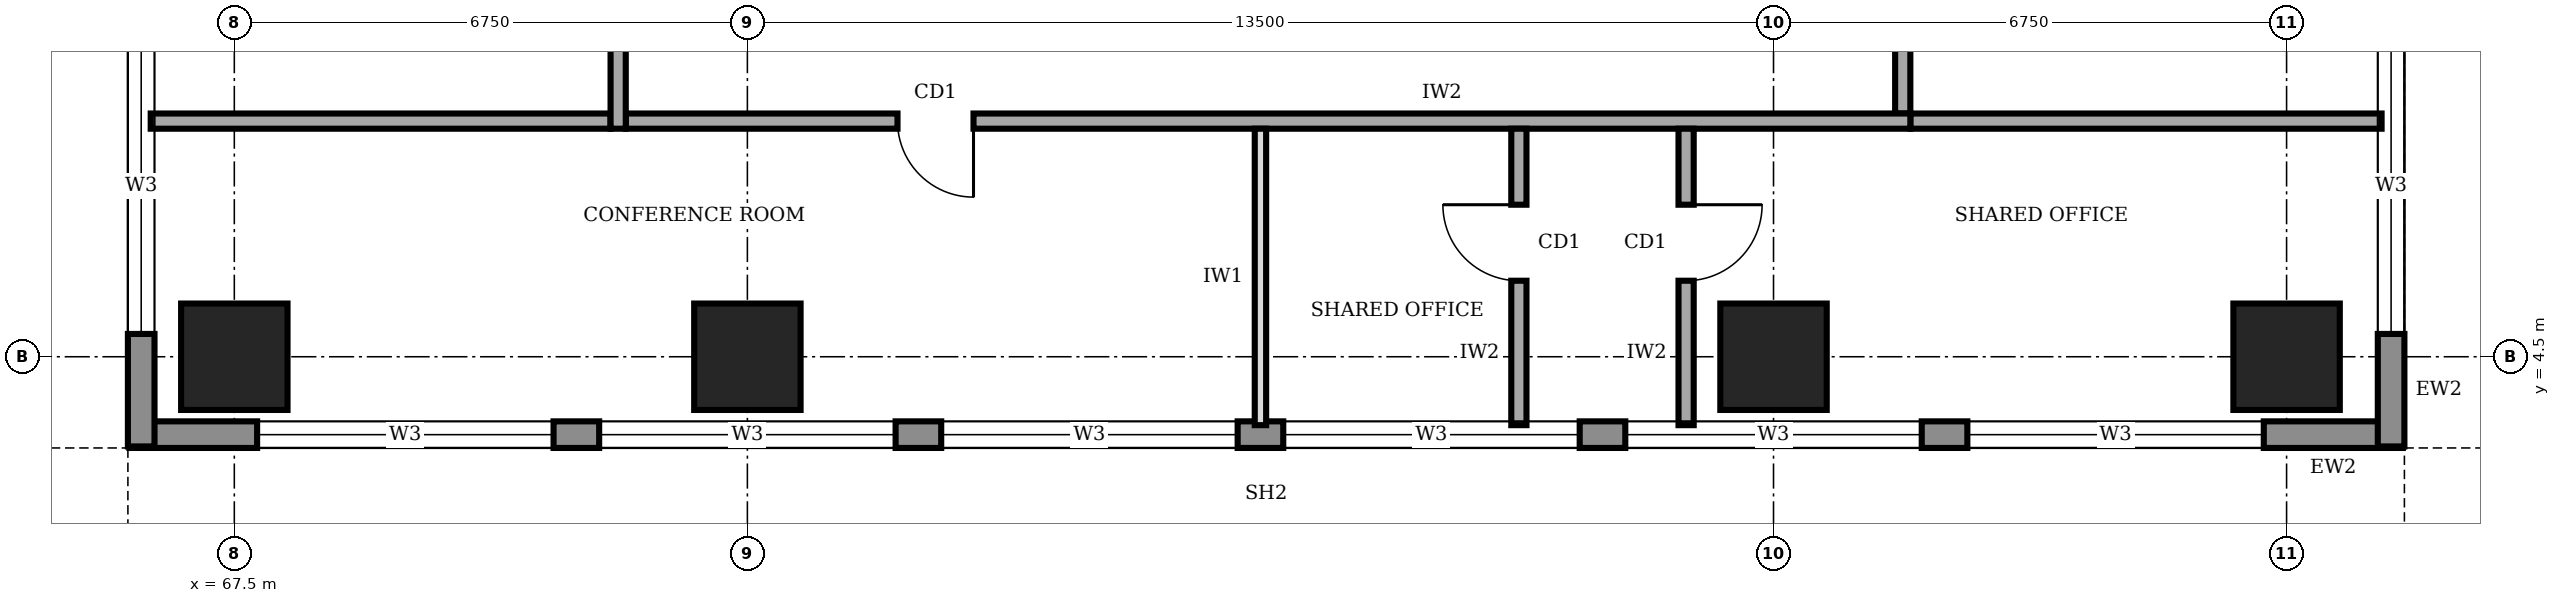
"""IFC4 building model, lengths in metres.
Left out: names, types, materials, properties, quantities, classifications, styles, units other than length and angle.
Written with IfcOpenShell. Run it as: python <this file> out.ifc"""

import sys

from ifc_helpers import new_model, si_unit, direction, frame, frame_2d, origin, origin_2d, place, context, subcontext, project, spatial, rectangle, extrude, element, fill, save


model = new_model("IFC4")
c1 = context("Model", 3, precision=1e-05, world=origin(), true_north=direction((0.0, 1.0)))
c2 = subcontext(c1, "Body", "Model", "MODEL_VIEW")
j1 = project(units=[si_unit("LENGTHUNIT", "METRE"), si_unit("PLANEANGLEUNIT", "RADIAN")], contexts=[c1])
p1 = place(None, origin())
s1 = spatial("IfcSite", under=j1, at=p1, CompositionType="ELEMENT")
p2 = place(p1, origin())
s2 = spatial("IfcBuilding", under=s1, at=p2, CompositionType="ELEMENT")
p3 = place(p2, frame((0.0, 0.0, 189.0)))
s3 = spatial("IfcBuildingStorey", under=s2, at=p3, CompositionType="ELEMENT", Elevation=189.0)
for number, where, z_axis, x_axis in (
    (1, (67.5, 4.5, 0.0), (0.0, 0.0, 1.0), (1.0, 0.0, 0.0)),
    (2, (74.25, 4.5, 0.0), (0.0, 0.0, 1.0), (1.0, 0.0, 0.0)),
    (3, (87.75, 4.5, 0.0), (0.0, 0.0, 1.0), (1.0, 0.0, 0.0)),
    (4, (94.5, 4.5, 0.0), (0.0, 0.0, 1.0), (1.0, 0.0, 0.0)),
):
    element("IfcColumn", number, at=place(p3, frame(where, z_axis=z_axis, x_axis=x_axis)), inside=s3, PredefinedType="COLUMN", context=c2, shape_type="SweptSolid", body=[
        extrude(rectangle(XDim=1.4, YDim=1.4, at=origin_2d()), origin(), (0.0, 0.0, 1.0), 4.0),
    ])
p4 = place(p3, frame((66.12, 3.475, 0.0), z_axis=(0.0, 0.0, 1.0), x_axis=(1.0, 0.0, 0.0)))
e5 = element("IfcWall", 5, at=p4, inside=s3, PredefinedType="STANDARD", context=c2, shape_type="SweptSolid", body=[
    extrude(rectangle(XDim=29.91, YDim=0.35, at=frame_2d((14.955, 0.0))), origin(), (0.0, 0.0, 1.0), 3.75),
])
p5 = place(p4, frame((1.68, 0.0, 0.95)))
e6 = element("IfcOpeningElement", 6, at=p5, cuts=e5, PredefinedType="OPENING", context=c2, shape_type="SweptSolid", body=[
    extrude(rectangle(XDim=3.9, YDim=1.8, at=frame_2d((1.95, 0.9))), frame((0.0, 0.185, 0.0), z_axis=(0.0, -1.0, 0.0), x_axis=(1.0, 0.0, 0.0)), (0.0, 0.0, 1.0), 0.37),
])
p6 = place(p4, frame((6.18, 0.0, 0.95)))
e7 = element("IfcOpeningElement", 7, at=p6, cuts=e5, PredefinedType="OPENING", context=c2, shape_type="SweptSolid", body=[
    extrude(rectangle(XDim=3.9, YDim=1.8, at=frame_2d((1.95, 0.9))), frame((0.0, 0.185, 0.0), z_axis=(0.0, -1.0, 0.0), x_axis=(1.0, 0.0, 0.0)), (0.0, 0.0, 1.0), 0.37),
])
p7 = place(p4, frame((10.68, 0.0, 0.95)))
e8 = element("IfcOpeningElement", 8, at=p7, cuts=e5, PredefinedType="OPENING", context=c2, shape_type="SweptSolid", body=[
    extrude(rectangle(XDim=3.9, YDim=1.8, at=frame_2d((1.95, 0.9))), frame((0.0, 0.185, 0.0), z_axis=(0.0, -1.0, 0.0), x_axis=(1.0, 0.0, 0.0)), (0.0, 0.0, 1.0), 0.37),
])
p8 = place(p4, frame((15.18, 0.0, 0.95)))
e9 = element("IfcOpeningElement", 9, at=p8, cuts=e5, PredefinedType="OPENING", context=c2, shape_type="SweptSolid", body=[
    extrude(rectangle(XDim=3.9, YDim=1.8, at=frame_2d((1.95, 0.9))), frame((0.0, 0.185, 0.0), z_axis=(0.0, -1.0, 0.0), x_axis=(1.0, 0.0, 0.0)), (0.0, 0.0, 1.0), 0.37),
])
p9 = place(p4, frame((19.68, 0.0, 0.95)))
e10 = element("IfcOpeningElement", 10, at=p9, cuts=e5, PredefinedType="OPENING", context=c2, shape_type="SweptSolid", body=[
    extrude(rectangle(XDim=3.9, YDim=1.8, at=frame_2d((1.95, 0.9))), frame((0.0, 0.185, 0.0), z_axis=(0.0, -1.0, 0.0), x_axis=(1.0, 0.0, 0.0)), (0.0, 0.0, 1.0), 0.37),
])
p10 = place(p4, frame((24.18, 0.0, 0.95)))
e11 = element("IfcOpeningElement", 11, at=p10, cuts=e5, PredefinedType="OPENING", context=c2, shape_type="SweptSolid", body=[
    extrude(rectangle(XDim=3.9, YDim=1.8, at=frame_2d((1.95, 0.9))), frame((0.0, 0.185, 0.0), z_axis=(0.0, -1.0, 0.0), x_axis=(1.0, 0.0, 0.0)), (0.0, 0.0, 1.0), 0.37),
])
p11 = place(p3, frame((95.875, 3.32, 0.0), z_axis=(0.0, 0.0, 1.0), x_axis=(0.0, 1.0, 0.0)))
e12 = element("IfcWall", 12, at=p11, inside=s3, PredefinedType="STANDARD", context=c2, shape_type="SweptSolid", body=[
    extrude(rectangle(XDim=33.86, YDim=0.35, at=frame_2d((16.93, 0.0))), origin(), (0.0, 0.0, 1.0), 3.75),
])
p12 = place(p11, frame((1.48, 0.0, 0.95)))
e13 = element("IfcOpeningElement", 13, at=p12, cuts=e12, PredefinedType="OPENING", context=c2, shape_type="SweptSolid", body=[
    extrude(rectangle(XDim=3.9, YDim=1.8, at=frame_2d((1.95, 0.9))), frame((0.0, 0.185, 0.0), z_axis=(0.0, -1.0, 0.0), x_axis=(1.0, 0.0, 0.0)), (0.0, 0.0, 1.0), 0.37),
])
p13 = place(p11, frame((5.98, 0.0, 0.95)))
e14 = element("IfcOpeningElement", 14, at=p13, cuts=e12, PredefinedType="OPENING", context=c2, shape_type="SweptSolid", body=[
    extrude(rectangle(XDim=3.9, YDim=1.8, at=frame_2d((1.95, 0.9))), frame((0.0, 0.185, 0.0), z_axis=(0.0, -1.0, 0.0), x_axis=(1.0, 0.0, 0.0)), (0.0, 0.0, 1.0), 0.37),
])
p14 = place(p11, frame((10.48, 0.0, 0.95)))
e15 = element("IfcOpeningElement", 15, at=p14, cuts=e12, PredefinedType="OPENING", context=c2, shape_type="SweptSolid", body=[
    extrude(rectangle(XDim=3.9, YDim=1.8, at=frame_2d((1.95, 0.9))), frame((0.0, 0.185, 0.0), z_axis=(0.0, -1.0, 0.0), x_axis=(1.0, 0.0, 0.0)), (0.0, 0.0, 1.0), 0.37),
])
p15 = place(p11, frame((14.98, 0.0, 0.95)))
e16 = element("IfcOpeningElement", 16, at=p15, cuts=e12, PredefinedType="OPENING", context=c2, shape_type="SweptSolid", body=[
    extrude(rectangle(XDim=3.9, YDim=1.8, at=frame_2d((1.95, 0.9))), frame((0.0, 0.185, 0.0), z_axis=(0.0, -1.0, 0.0), x_axis=(1.0, 0.0, 0.0)), (0.0, 0.0, 1.0), 0.37),
])
p16 = place(p11, frame((19.48, 0.0, 0.95)))
e17 = element("IfcOpeningElement", 17, at=p16, cuts=e12, PredefinedType="OPENING", context=c2, shape_type="SweptSolid", body=[
    extrude(rectangle(XDim=3.9, YDim=1.8, at=frame_2d((1.95, 0.9))), frame((0.0, 0.185, 0.0), z_axis=(0.0, -1.0, 0.0), x_axis=(1.0, 0.0, 0.0)), (0.0, 0.0, 1.0), 0.37),
])
p17 = place(p11, frame((23.98, 0.0, 0.95)))
e18 = element("IfcOpeningElement", 18, at=p17, cuts=e12, PredefinedType="OPENING", context=c2, shape_type="SweptSolid", body=[
    extrude(rectangle(XDim=3.9, YDim=1.8, at=frame_2d((1.95, 0.9))), frame((0.0, 0.185, 0.0), z_axis=(0.0, -1.0, 0.0), x_axis=(1.0, 0.0, 0.0)), (0.0, 0.0, 1.0), 0.37),
])
p18 = place(p11, frame((28.48, 0.0, 0.95)))
e19 = element("IfcOpeningElement", 19, at=p18, cuts=e12, PredefinedType="OPENING", context=c2, shape_type="SweptSolid", body=[
    extrude(rectangle(XDim=3.9, YDim=1.8, at=frame_2d((1.95, 0.9))), frame((0.0, 0.185, 0.0), z_axis=(0.0, -1.0, 0.0), x_axis=(1.0, 0.0, 0.0)), (0.0, 0.0, 1.0), 0.37),
])
p19 = place(p3, frame((66.275, 37.18, 0.0), z_axis=(0.0, 0.0, 1.0), x_axis=(0.0, -1.0, 0.0)))
e20 = element("IfcWall", 20, at=p19, inside=s3, PredefinedType="STANDARD", context=c2, shape_type="SweptSolid", body=[
    extrude(rectangle(XDim=33.86, YDim=0.35, at=frame_2d((16.93, 0.0))), origin(), (0.0, 0.0, 1.0), 3.75),
])
p20 = place(p19, frame((28.48, 0.0, 0.95)))
e21 = element("IfcOpeningElement", 21, at=p20, cuts=e20, PredefinedType="OPENING", context=c2, shape_type="SweptSolid", body=[
    extrude(rectangle(XDim=3.9, YDim=1.8, at=frame_2d((1.95, 0.9))), frame((0.0, 0.185, 0.0), z_axis=(0.0, -1.0, 0.0), x_axis=(1.0, 0.0, 0.0)), (0.0, 0.0, 1.0), 0.37),
])
p21 = place(p19, frame((23.98, 0.0, 0.95)))
e22 = element("IfcOpeningElement", 22, at=p21, cuts=e20, PredefinedType="OPENING", context=c2, shape_type="SweptSolid", body=[
    extrude(rectangle(XDim=3.9, YDim=1.8, at=frame_2d((1.95, 0.9))), frame((0.0, 0.185, 0.0), z_axis=(0.0, -1.0, 0.0), x_axis=(1.0, 0.0, 0.0)), (0.0, 0.0, 1.0), 0.37),
])
p22 = place(p19, frame((19.48, 0.0, 0.95)))
e23 = element("IfcOpeningElement", 23, at=p22, cuts=e20, PredefinedType="OPENING", context=c2, shape_type="SweptSolid", body=[
    extrude(rectangle(XDim=3.9, YDim=1.8, at=frame_2d((1.95, 0.9))), frame((0.0, 0.185, 0.0), z_axis=(0.0, -1.0, 0.0), x_axis=(1.0, 0.0, 0.0)), (0.0, 0.0, 1.0), 0.37),
])
p23 = place(p19, frame((14.98, 0.0, 0.95)))
e24 = element("IfcOpeningElement", 24, at=p23, cuts=e20, PredefinedType="OPENING", context=c2, shape_type="SweptSolid", body=[
    extrude(rectangle(XDim=3.9, YDim=1.8, at=frame_2d((1.95, 0.9))), frame((0.0, 0.185, 0.0), z_axis=(0.0, -1.0, 0.0), x_axis=(1.0, 0.0, 0.0)), (0.0, 0.0, 1.0), 0.37),
])
p24 = place(p19, frame((10.48, 0.0, 0.95)))
e25 = element("IfcOpeningElement", 25, at=p24, cuts=e20, PredefinedType="OPENING", context=c2, shape_type="SweptSolid", body=[
    extrude(rectangle(XDim=3.9, YDim=1.8, at=frame_2d((1.95, 0.9))), frame((0.0, 0.185, 0.0), z_axis=(0.0, -1.0, 0.0), x_axis=(1.0, 0.0, 0.0)), (0.0, 0.0, 1.0), 0.37),
])
p25 = place(p19, frame((5.98, 0.0, 0.95)))
e26 = element("IfcOpeningElement", 26, at=p25, cuts=e20, PredefinedType="OPENING", context=c2, shape_type="SweptSolid", body=[
    extrude(rectangle(XDim=3.9, YDim=1.8, at=frame_2d((1.95, 0.9))), frame((0.0, 0.185, 0.0), z_axis=(0.0, -1.0, 0.0), x_axis=(1.0, 0.0, 0.0)), (0.0, 0.0, 1.0), 0.37),
])
p26 = place(p19, frame((1.48, 0.0, 0.95)))
e27 = element("IfcOpeningElement", 27, at=p26, cuts=e20, PredefinedType="OPENING", context=c2, shape_type="SweptSolid", body=[
    extrude(rectangle(XDim=3.9, YDim=1.8, at=frame_2d((1.95, 0.9))), frame((0.0, 0.185, 0.0), z_axis=(0.0, -1.0, 0.0), x_axis=(1.0, 0.0, 0.0)), (0.0, 0.0, 1.0), 0.37),
])
p27 = place(p3, frame((72.65, 7.6, 0.0), z_axis=(0.0, 0.0, 1.0), x_axis=(1.0, 0.0, 0.0)))
e28 = element("IfcWall", 28, at=p27, inside=s3, PredefinedType="SOLIDWALL", context=c2, shape_type="SweptSolid", body=[
    extrude(rectangle(XDim=16.9, YDim=0.2, at=frame_2d((8.45, 0.0))), origin(), (0.0, 0.0, 1.0), 3.75),
])
p28 = place(p27, frame((3.575, 0.0, 0.0)))
e29 = element("IfcOpeningElement", 29, at=p28, cuts=e28, PredefinedType="OPENING", context=c2, shape_type="SweptSolid", body=[
    extrude(rectangle(XDim=1.0, YDim=2.1, at=frame_2d((0.5, 1.05))), frame((0.0, 0.11, 0.0), z_axis=(0.0, -1.0, 0.0), x_axis=(1.0, 0.0, 0.0)), (0.0, 0.0, 1.0), 0.22),
])
p29 = place(p3, frame((89.45, 7.7, 0.0), z_axis=(0.0, 0.0, 1.0), x_axis=(0.0, 1.0, 0.0)))
e30 = element("IfcWall", 30, at=p29, inside=s3, PredefinedType="SOLIDWALL", context=c2, shape_type="SweptSolid", body=[
    extrude(rectangle(XDim=25.3, YDim=0.2, at=frame_2d((12.65, 0.0))), origin(), (0.0, 0.0, 1.0), 3.75),
])
p30 = place(p29, frame((2.3, 0.0, 0.0)))
e31 = element("IfcOpeningElement", 31, at=p30, cuts=e30, PredefinedType="OPENING", context=c2, shape_type="SweptSolid", body=[
    extrude(rectangle(XDim=1.0, YDim=2.1, at=frame_2d((0.5, 1.05))), frame((0.0, 0.11, 0.0), z_axis=(0.0, -1.0, 0.0), x_axis=(1.0, 0.0, 0.0)), (0.0, 0.0, 1.0), 0.22),
])
p31 = place(p29, frame((6.4, 0.0, 0.0)))
e32 = element("IfcOpeningElement", 32, at=p31, cuts=e30, PredefinedType="OPENING", context=c2, shape_type="SweptSolid", body=[
    extrude(rectangle(XDim=1.0, YDim=2.1, at=frame_2d((0.5, 1.05))), frame((0.0, 0.11, 0.0), z_axis=(0.0, -1.0, 0.0), x_axis=(1.0, 0.0, 0.0)), (0.0, 0.0, 1.0), 0.22),
])
p32 = place(p29, frame((9.5, 0.0, 0.0)))
e33 = element("IfcOpeningElement", 33, at=p32, cuts=e30, PredefinedType="OPENING", context=c2, shape_type="SweptSolid", body=[
    extrude(rectangle(XDim=0.9, YDim=2.1, at=frame_2d((0.45, 1.05))), frame((0.0, 0.11, 0.0), z_axis=(0.0, -1.0, 0.0), x_axis=(1.0, 0.0, 0.0)), (0.0, 0.0, 1.0), 0.22),
])
p33 = place(p29, frame((12.55, 0.0, 0.0)))
e34 = element("IfcOpeningElement", 34, at=p33, cuts=e30, PredefinedType="OPENING", context=c2, shape_type="SweptSolid", body=[
    extrude(rectangle(XDim=0.9, YDim=2.1, at=frame_2d((0.45, 1.05))), frame((0.0, 0.11, 0.0), z_axis=(0.0, -1.0, 0.0), x_axis=(1.0, 0.0, 0.0)), (0.0, 0.0, 1.0), 0.22),
])
p34 = place(p29, frame((17.25, 0.0, 0.0)))
e35 = element("IfcOpeningElement", 35, at=p34, cuts=e30, PredefinedType="OPENING", context=c2, shape_type="SweptSolid", body=[
    extrude(rectangle(XDim=0.9, YDim=2.1, at=frame_2d((0.45, 1.05))), frame((0.0, 0.11, 0.0), z_axis=(0.0, -1.0, 0.0), x_axis=(1.0, 0.0, 0.0)), (0.0, 0.0, 1.0), 0.22),
])
p35 = place(p29, frame((14.6, 0.0, 0.0)))
e36 = element("IfcOpeningElement", 36, at=p35, cuts=e30, PredefinedType="OPENING", context=c2, shape_type="SweptSolid", body=[
    extrude(rectangle(XDim=1.0, YDim=2.1, at=frame_2d((0.5, 1.05))), frame((0.0, 0.11, 0.0), z_axis=(0.0, -1.0, 0.0), x_axis=(1.0, 0.0, 0.0)), (0.0, 0.0, 1.0), 0.22),
])
p36 = place(p29, frame((21.8, 0.0, 0.0)))
e37 = element("IfcOpeningElement", 37, at=p36, cuts=e30, PredefinedType="OPENING", context=c2, shape_type="SweptSolid", body=[
    extrude(rectangle(XDim=1.0, YDim=2.1, at=frame_2d((0.5, 1.05))), frame((0.0, 0.11, 0.0), z_axis=(0.0, -1.0, 0.0), x_axis=(1.0, 0.0, 0.0)), (0.0, 0.0, 1.0), 0.22),
])
p37 = place(p3, frame((72.55, 32.8, 0.0), z_axis=(0.0, 0.0, 1.0), x_axis=(0.0, -1.0, 0.0)))
e38 = element("IfcWall", 38, at=p37, inside=s3, PredefinedType="SOLIDWALL", context=c2, shape_type="SweptSolid", body=[
    extrude(rectangle(XDim=25.3, YDim=0.2, at=frame_2d((12.65, 0.0))), origin(), (0.0, 0.0, 1.0), 3.75),
])
p38 = place(p37, frame((19.55, 0.0, 0.0)))
e39 = element("IfcOpeningElement", 39, at=p38, cuts=e38, PredefinedType="OPENING", context=c2, shape_type="SweptSolid", body=[
    extrude(rectangle(XDim=1.0, YDim=2.1, at=frame_2d((0.5, 1.05))), frame((0.0, 0.11, 0.0), z_axis=(0.0, -1.0, 0.0), x_axis=(1.0, 0.0, 0.0)), (0.0, 0.0, 1.0), 0.22),
])
p39 = place(p37, frame((6.8, 0.0, 0.0)))
e40 = element("IfcOpeningElement", 40, at=p39, cuts=e38, PredefinedType="OPENING", context=c2, shape_type="SweptSolid", body=[
    extrude(rectangle(XDim=1.0, YDim=2.1, at=frame_2d((0.5, 1.05))), frame((0.0, 0.11, 0.0), z_axis=(0.0, -1.0, 0.0), x_axis=(1.0, 0.0, 0.0)), (0.0, 0.0, 1.0), 0.22),
])
p40 = place(p3, frame((84.4, 3.6, 0.0), z_axis=(0.0, 0.0, 1.0), x_axis=(0.0, 1.0, 0.0)))
e41 = element("IfcWall", 41, at=p40, inside=s3, PredefinedType="SOLIDWALL", context=c2, shape_type="SweptSolid", body=[
    extrude(rectangle(XDim=3.9, YDim=0.2, at=frame_2d((1.95, 0.0))), origin(), (0.0, 0.0, 1.0), 3.75),
])
p41 = place(p40, frame((1.9, 0.0, 0.0)))
e42 = element("IfcOpeningElement", 42, at=p41, cuts=e41, PredefinedType="OPENING", context=c2, shape_type="SweptSolid", body=[
    extrude(rectangle(XDim=1.0, YDim=2.1, at=frame_2d((0.5, 1.05))), frame((0.0, 0.11, 0.0), z_axis=(0.0, -1.0, 0.0), x_axis=(1.0, 0.0, 0.0)), (0.0, 0.0, 1.0), 0.22),
])
p42 = place(p3, frame((86.6, 7.5, 0.0), z_axis=(0.0, 0.0, 1.0), x_axis=(0.0, -1.0, 0.0)))
e43 = element("IfcWall", 43, at=p42, inside=s3, PredefinedType="SOLIDWALL", context=c2, shape_type="SweptSolid", body=[
    extrude(rectangle(XDim=3.9, YDim=0.2, at=frame_2d((1.95, 0.0))), origin(), (0.0, 0.0, 1.0), 3.75),
])
p43 = place(p42, frame((1.0, 0.0, 0.0)))
e44 = element("IfcOpeningElement", 44, at=p43, cuts=e43, PredefinedType="OPENING", context=c2, shape_type="SweptSolid", body=[
    extrude(rectangle(XDim=1.0, YDim=2.1, at=frame_2d((0.5, 1.05))), frame((0.0, 0.11, 0.0), z_axis=(0.0, -1.0, 0.0), x_axis=(1.0, 0.0, 0.0)), (0.0, 0.0, 1.0), 0.22),
])
p44 = place(p3, frame((66.4, 7.6, 0.0), z_axis=(0.0, 0.0, 1.0), x_axis=(1.0, 0.0, 0.0)))
e45 = element("IfcWall", 45, at=p44, inside=s3, PredefinedType="SOLIDWALL", context=c2, shape_type="SweptSolid", body=[
    extrude(rectangle(XDim=6.05, YDim=0.2, at=frame_2d((3.025, 0.0))), origin(), (0.0, 0.0, 1.0), 3.75),
])
p45 = place(p3, frame((89.55, 7.6, 0.0), z_axis=(0.0, 0.0, 1.0), x_axis=(1.0, 0.0, 0.0)))
e46 = element("IfcWall", 46, at=p45, inside=s3, PredefinedType="SOLIDWALL", context=c2, shape_type="SweptSolid", body=[
    extrude(rectangle(XDim=6.2, YDim=0.2, at=frame_2d((3.1, 0.0))), origin(), (0.0, 0.0, 1.0), 3.75),
])
p46 = place(p3, frame((81.0, 3.6, 0.0), z_axis=(0.0, 0.0, 1.0), x_axis=(0.0, 1.0, 0.0)))
e47 = element("IfcWall", 47, at=p46, inside=s3, PredefinedType="PARTITIONING", context=c2, shape_type="SweptSolid", body=[
    extrude(rectangle(XDim=3.9, YDim=0.15, at=frame_2d((1.95, 0.0))), origin(), (0.0, 0.0, 1.0), 3.75),
])
p47 = place(p5, origin())
e48 = element("IfcWindow", 48, at=p47, inside=s3, PartitioningType="SINGLE_PANEL", PredefinedType="WINDOW", context=c2, shape_type="SweptSolid", body=[
    extrude(rectangle(XDim=3.9, YDim=1.8, at=frame_2d((1.95, 0.9))), frame((0.0, 0.03, 0.0), z_axis=(0.0, -1.0, 0.0), x_axis=(1.0, 0.0, 0.0)), (0.0, 0.0, 1.0), 0.06),
])
fill(e6, e48)
p48 = place(p6, origin())
e49 = element("IfcWindow", 49, at=p48, inside=s3, PartitioningType="SINGLE_PANEL", PredefinedType="WINDOW", context=c2, shape_type="SweptSolid", body=[
    extrude(rectangle(XDim=3.9, YDim=1.8, at=frame_2d((1.95, 0.9))), frame((0.0, 0.03, 0.0), z_axis=(0.0, -1.0, 0.0), x_axis=(1.0, 0.0, 0.0)), (0.0, 0.0, 1.0), 0.06),
])
fill(e7, e49)
p49 = place(p7, origin())
e50 = element("IfcWindow", 50, at=p49, inside=s3, PartitioningType="SINGLE_PANEL", PredefinedType="WINDOW", context=c2, shape_type="SweptSolid", body=[
    extrude(rectangle(XDim=3.9, YDim=1.8, at=frame_2d((1.95, 0.9))), frame((0.0, 0.03, 0.0), z_axis=(0.0, -1.0, 0.0), x_axis=(1.0, 0.0, 0.0)), (0.0, 0.0, 1.0), 0.06),
])
fill(e8, e50)
p50 = place(p8, origin())
e51 = element("IfcWindow", 51, at=p50, inside=s3, PartitioningType="SINGLE_PANEL", PredefinedType="WINDOW", context=c2, shape_type="SweptSolid", body=[
    extrude(rectangle(XDim=3.9, YDim=1.8, at=frame_2d((1.95, 0.9))), frame((0.0, 0.03, 0.0), z_axis=(0.0, -1.0, 0.0), x_axis=(1.0, 0.0, 0.0)), (0.0, 0.0, 1.0), 0.06),
])
fill(e9, e51)
p51 = place(p9, origin())
e52 = element("IfcWindow", 52, at=p51, inside=s3, PartitioningType="SINGLE_PANEL", PredefinedType="WINDOW", context=c2, shape_type="SweptSolid", body=[
    extrude(rectangle(XDim=3.9, YDim=1.8, at=frame_2d((1.95, 0.9))), frame((0.0, 0.03, 0.0), z_axis=(0.0, -1.0, 0.0), x_axis=(1.0, 0.0, 0.0)), (0.0, 0.0, 1.0), 0.06),
])
fill(e10, e52)
p52 = place(p10, origin())
e53 = element("IfcWindow", 53, at=p52, inside=s3, PartitioningType="SINGLE_PANEL", PredefinedType="WINDOW", context=c2, shape_type="SweptSolid", body=[
    extrude(rectangle(XDim=3.9, YDim=1.8, at=frame_2d((1.95, 0.9))), frame((0.0, 0.03, 0.0), z_axis=(0.0, -1.0, 0.0), x_axis=(1.0, 0.0, 0.0)), (0.0, 0.0, 1.0), 0.06),
])
fill(e11, e53)
p53 = place(p12, origin())
e54 = element("IfcWindow", 54, at=p53, inside=s3, PartitioningType="SINGLE_PANEL", PredefinedType="WINDOW", context=c2, shape_type="SweptSolid", body=[
    extrude(rectangle(XDim=3.9, YDim=1.8, at=frame_2d((1.95, 0.9))), frame((0.0, 0.03, 0.0), z_axis=(0.0, -1.0, 0.0), x_axis=(1.0, 0.0, 0.0)), (0.0, 0.0, 1.0), 0.06),
])
fill(e13, e54)
p54 = place(p20, origin())
e55 = element("IfcWindow", 55, at=p54, inside=s3, PartitioningType="SINGLE_PANEL", PredefinedType="WINDOW", context=c2, shape_type="SweptSolid", body=[
    extrude(rectangle(XDim=3.9, YDim=1.8, at=frame_2d((1.95, 0.9))), frame((0.0, 0.03, 0.0), z_axis=(0.0, -1.0, 0.0), x_axis=(1.0, 0.0, 0.0)), (0.0, 0.0, 1.0), 0.06),
])
fill(e21, e55)
p55 = place(p28, frame((1.0, 0.0, 0.0), z_axis=(0.0, 0.0, 1.0), x_axis=(-1.0, 0.0, 0.0)))
e56 = element("IfcDoor", 56, at=p55, inside=s3, OperationType="SINGLE_SWING_LEFT", PredefinedType="DOOR", context=c2, shape_type="SweptSolid", body=[
    extrude(rectangle(XDim=1.0, YDim=2.1, at=frame_2d((0.5, 1.05))), frame((0.0, 0.025, 0.0), z_axis=(0.0, -1.0, 0.0), x_axis=(1.0, 0.0, 0.0)), (0.0, 0.0, 1.0), 0.05),
])
fill(e29, e56)
p56 = place(p41, origin())
e57 = element("IfcDoor", 57, at=p56, inside=s3, OperationType="SINGLE_SWING_RIGHT", PredefinedType="DOOR", context=c2, shape_type="SweptSolid", body=[
    extrude(rectangle(XDim=1.0, YDim=2.1, at=frame_2d((0.5, 1.05))), frame((0.0, 0.025, 0.0), z_axis=(0.0, -1.0, 0.0), x_axis=(1.0, 0.0, 0.0)), (0.0, 0.0, 1.0), 0.05),
])
fill(e42, e57)
p57 = place(p43, origin())
e58 = element("IfcDoor", 58, at=p57, inside=s3, OperationType="SINGLE_SWING_LEFT", PredefinedType="DOOR", context=c2, shape_type="SweptSolid", body=[
    extrude(rectangle(XDim=1.0, YDim=2.1, at=frame_2d((0.5, 1.05))), frame((0.0, 0.025, 0.0), z_axis=(0.0, -1.0, 0.0), x_axis=(1.0, 0.0, 0.0)), (0.0, 0.0, 1.0), 0.05),
])
fill(e44, e58)
save(model, sys.argv[1])
